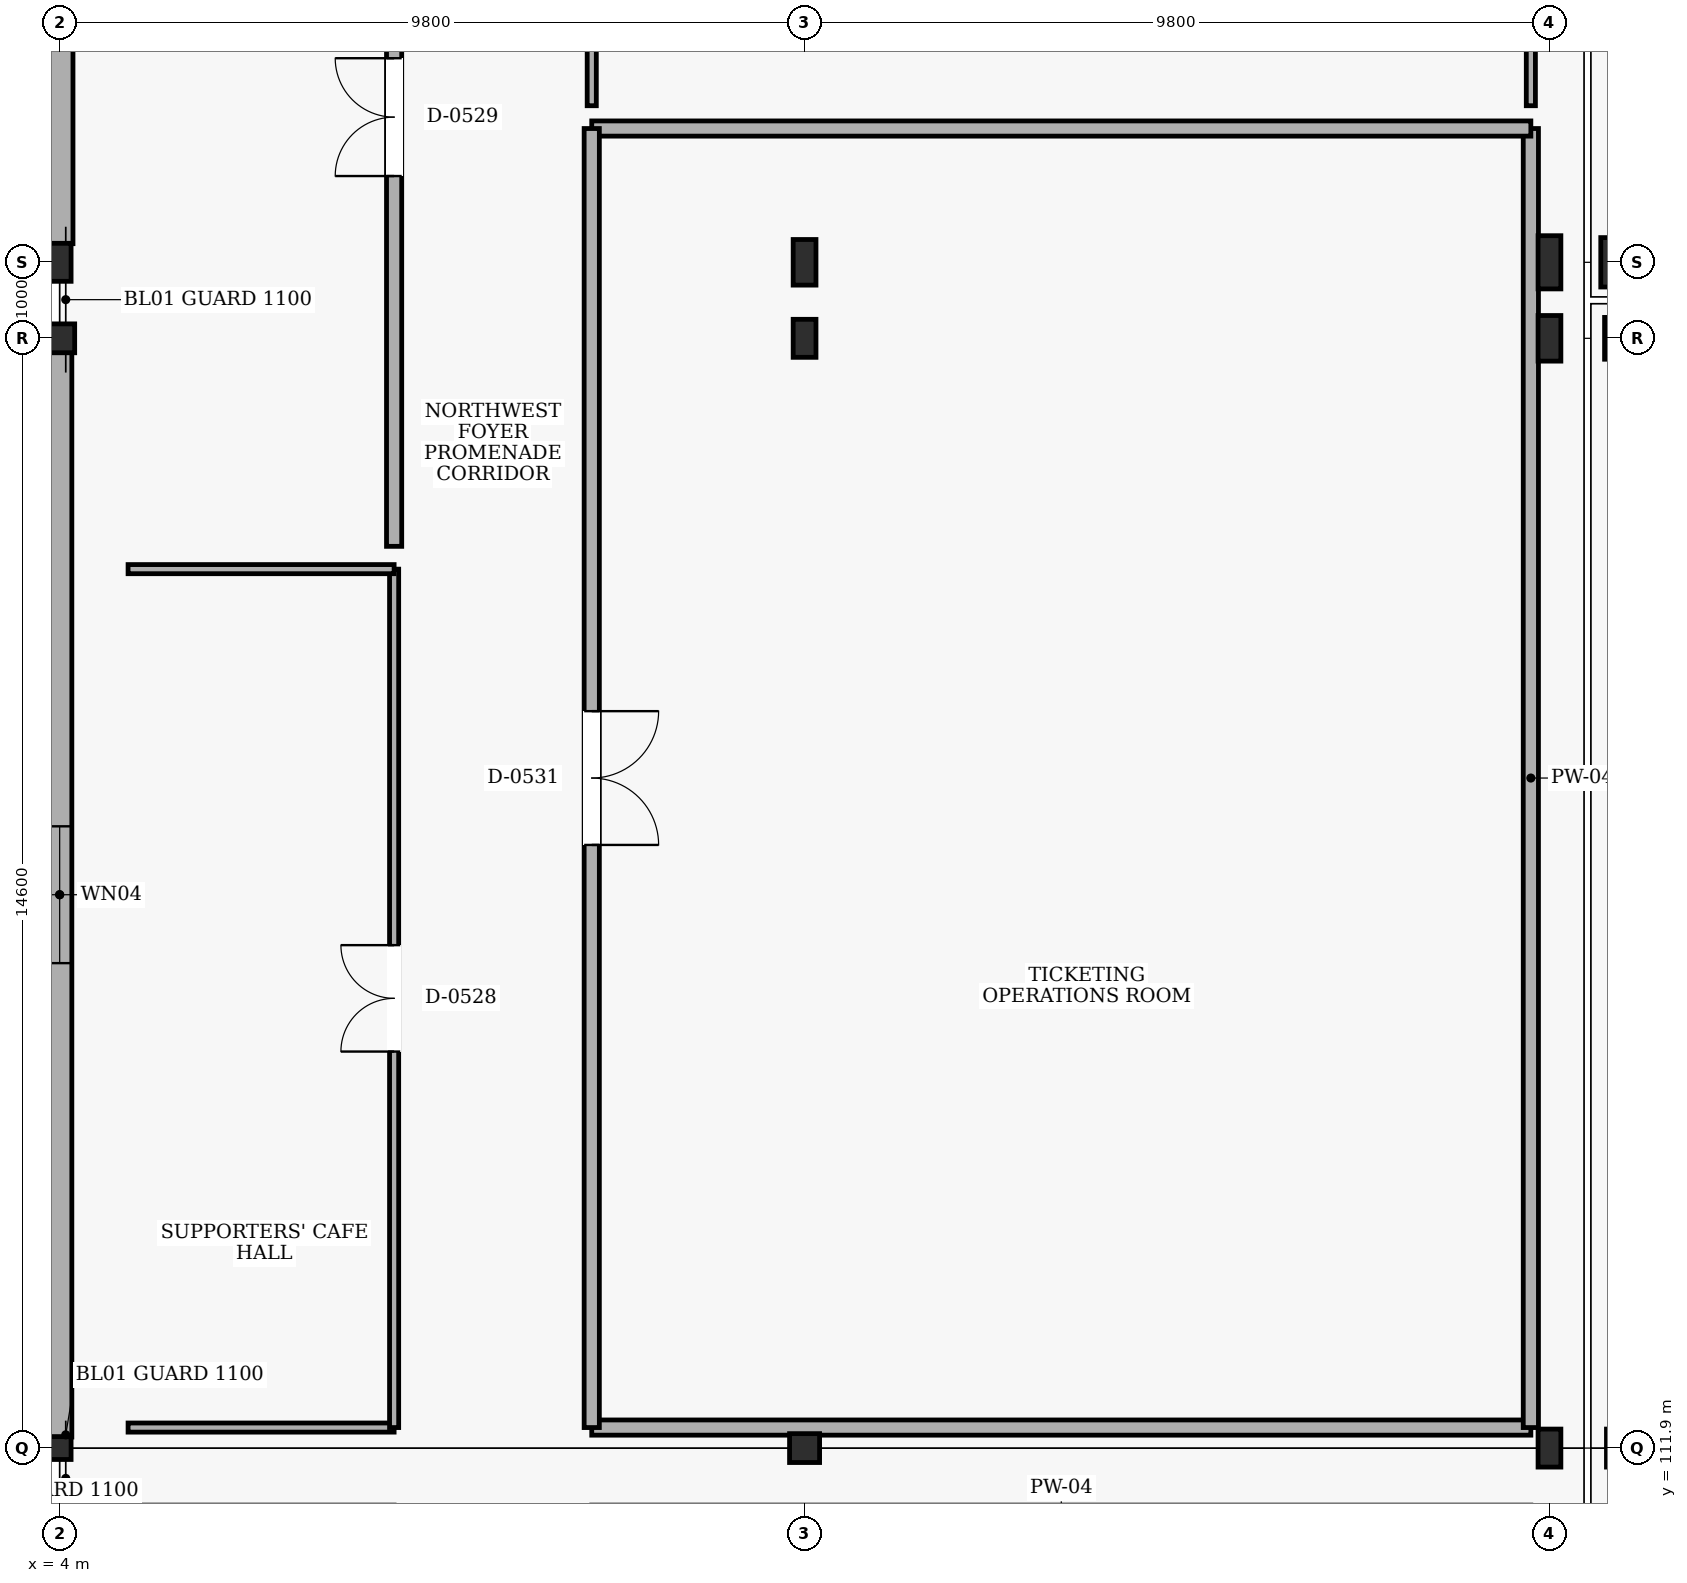
"""IFC4 building model, lengths in metres.
Left out: names, types, materials, properties, quantities, classifications, styles, units other than length and angle.
Written with IfcOpenShell. Run it as: python <this file> out.ifc"""

import sys

from ifc_helpers import new_model, si_unit, direction, frame, frame_2d, origin, origin_2d, place, context, subcontext, project, spatial, rectangle, hollow_rectangle, i_section, extrude, element, fill, save


model = new_model("IFC4")
c1 = context("Model", 3, precision=1e-05, world=origin(), true_north=direction((0.0, 1.0)))
c2 = subcontext(c1, "Body", "Model", "MODEL_VIEW")
j1 = project(units=[si_unit("LENGTHUNIT", "METRE"), si_unit("PLANEANGLEUNIT", "RADIAN")], contexts=[c1])
p1 = place(None, origin())
s1 = spatial("IfcSite", under=j1, at=p1, CompositionType="ELEMENT")
p2 = place(p1, origin())
s2 = spatial("IfcBuilding", under=s1, at=p2, CompositionType="ELEMENT")
p3 = place(p2, frame((0.0, 0.0, 5.4)))
s3 = spatial("IfcBuildingStorey", under=s2, at=p3, CompositionType="ELEMENT", Elevation=5.4)
p4 = place(p3, frame((4.0, 111.9, 0.0), z_axis=(0.0, 0.0, 1.0), x_axis=(1.0, 0.0, 0.0)))
e1 = element("IfcColumn", 1, at=p4, inside=s3, PredefinedType="COLUMN", context=c2, shape_type="SweptSolid", body=[
    extrude(hollow_rectangle(XDim=0.3, YDim=0.3, WallThickness=0.016, at=origin_2d()), origin(), (0.0, 0.0, 1.0), 4.8),
])
p5 = place(p3, frame((4.0, 126.5, 0.0), z_axis=(0.0, 0.0, 1.0), x_axis=(1.0, 0.0, 0.0)))
e2 = element("IfcColumn", 2, at=p5, inside=s3, PredefinedType="COLUMN", context=c2, shape_type="SweptSolid", body=[
    extrude(i_section(OverallWidth=0.395, OverallDepth=0.38, WebThickness=0.019, FlangeThickness=0.03, at=origin_2d()), origin(), (0.0, 0.0, 1.0), 4.8),
])
p6 = place(p3, frame((4.0, 127.5, 0.0), z_axis=(0.0, 0.0, 1.0), x_axis=(1.0, 0.0, 0.0)))
e3 = element("IfcColumn", 3, at=p6, inside=s3, PredefinedType="COLUMN", context=c2, shape_type="SweptSolid", body=[
    extrude(i_section(OverallWidth=0.3, OverallDepth=0.5, WebThickness=0.014, FlangeThickness=0.028, at=origin_2d()), origin(), (0.0, 0.0, 1.0), 4.8),
])
p7 = place(p3, frame((13.8, 111.9, 0.0), z_axis=(0.0, 0.0, 1.0), x_axis=(1.0, 0.0, 0.0)))
e4 = element("IfcColumn", 4, at=p7, inside=s3, PredefinedType="COLUMN", context=c2, shape_type="SweptSolid", body=[
    extrude(i_section(OverallWidth=0.395, OverallDepth=0.38, WebThickness=0.019, FlangeThickness=0.03, at=origin_2d()), origin(), (0.0, 0.0, 1.0), 4.8),
])
p8 = place(p3, frame((13.8, 126.5, 0.0), z_axis=(0.0, 0.0, 1.0), x_axis=(1.0, 0.0, 0.0)))
e5 = element("IfcColumn", 5, at=p8, inside=s3, PredefinedType="COLUMN", context=c2, shape_type="SweptSolid", body=[
    extrude(i_section(OverallWidth=0.3, OverallDepth=0.5, WebThickness=0.014, FlangeThickness=0.028, at=origin_2d()), origin(), (0.0, 0.0, 1.0), 4.8),
])
p9 = place(p3, frame((13.8, 127.5, 0.0), z_axis=(0.0, 0.0, 1.0), x_axis=(1.0, 0.0, 0.0)))
e6 = element("IfcColumn", 6, at=p9, inside=s3, PredefinedType="COLUMN", context=c2, shape_type="SweptSolid", body=[
    extrude(i_section(OverallWidth=0.3, OverallDepth=0.6, WebThickness=0.015, FlangeThickness=0.03, at=origin_2d()), origin(), (0.0, 0.0, 1.0), 4.8),
])
p10 = place(p3, frame((23.6, 111.9, 0.0), z_axis=(0.0, 0.0, 1.0), x_axis=(1.0, 0.0, 0.0)))
e7 = element("IfcColumn", 7, at=p10, inside=s3, PredefinedType="COLUMN", context=c2, shape_type="SweptSolid", body=[
    extrude(i_section(OverallWidth=0.3, OverallDepth=0.5, WebThickness=0.014, FlangeThickness=0.028, at=origin_2d()), origin(), (0.0, 0.0, 1.0), 4.8),
])
p11 = place(p3, frame((23.6, 126.5, 0.0), z_axis=(0.0, 0.0, 1.0), x_axis=(1.0, 0.0, 0.0)))
e8 = element("IfcColumn", 8, at=p11, inside=s3, PredefinedType="COLUMN", context=c2, shape_type="SweptSolid", body=[
    extrude(i_section(OverallWidth=0.3, OverallDepth=0.6, WebThickness=0.015, FlangeThickness=0.03, at=origin_2d()), origin(), (0.0, 0.0, 1.0), 4.8),
])
p12 = place(p3, frame((23.6, 127.5, 0.0), z_axis=(0.0, 0.0, 1.0), x_axis=(1.0, 0.0, 0.0)))
e9 = element("IfcColumn", 9, at=p12, inside=s3, PredefinedType="COLUMN", context=c2, shape_type="SweptSolid", body=[
    extrude(i_section(OverallWidth=0.3, OverallDepth=0.7, WebThickness=0.017, FlangeThickness=0.032, at=origin_2d()), origin(), (0.0, 0.0, 1.0), 4.8),
])
p13 = place(p3, frame((24.6, 111.9, 0.0), z_axis=(0.0, 0.0, 1.0), x_axis=(1.0, 0.0, 0.0)))
e10 = element("IfcColumn", 10, at=p13, inside=s3, PredefinedType="COLUMN", context=c2, shape_type="SweptSolid", body=[
    extrude(rectangle(XDim=0.5, YDim=0.5, at=origin_2d()), origin(), (0.0, 0.0, 1.0), 4.8),
])
p14 = place(p3, frame((24.6, 126.5, 0.0), z_axis=(0.0, 0.0, 1.0), x_axis=(1.0, 0.0, 0.0)))
e11 = element("IfcColumn", 11, at=p14, inside=s3, PredefinedType="COLUMN", context=c2, shape_type="SweptSolid", body=[
    extrude(rectangle(XDim=0.55, YDim=0.55, at=origin_2d()), origin(), (0.0, 0.0, 1.0), 4.8),
])
p15 = place(p3, frame((24.6, 127.5, 0.0), z_axis=(0.0, 0.0, 1.0), x_axis=(1.0, 0.0, 0.0)))
e12 = element("IfcColumn", 12, at=p15, inside=s3, PredefinedType="COLUMN", context=c2, shape_type="SweptSolid", body=[
    extrude(rectangle(XDim=0.65, YDim=0.65, at=origin_2d()), origin(), (0.0, 0.0, 1.0), 4.8),
])
p16 = place(p3, frame((4.0, 112.045, 0.0), z_axis=(0.0, 0.0, 1.0), x_axis=(0.0, 1.0, 0.0)))
e13 = element("IfcWall", 13, at=p16, inside=s3, PredefinedType="SOLIDWALL", context=c2, shape_type="SweptSolid", body=[
    extrude(rectangle(XDim=14.27, YDim=0.32, at=frame_2d((7.135, 0.0))), origin(), (0.0, 0.0, 1.0), 4.03),
])
p17 = place(p16, frame((6.235, 0.0, 0.9)))
e14 = element("IfcOpeningElement", 14, at=p17, cuts=e13, PredefinedType="OPENING", context=c2, shape_type="SweptSolid", body=[
    extrude(rectangle(XDim=1.8, YDim=1.5, at=frame_2d((0.9, 0.75))), frame((0.0, 0.17, 0.0), z_axis=(0.0, -1.0, 0.0), x_axis=(1.0, 0.0, 0.0)), (0.0, 0.0, 1.0), 0.34),
])
p18 = place(p3, frame((4.0, 127.745, 0.0), z_axis=(0.0, 0.0, 1.0), x_axis=(0.0, 1.0, 0.0)))
e15 = element("IfcWall", 15, at=p18, inside=s3, PredefinedType="SOLIDWALL", context=c2, shape_type="SweptSolid", body=[
    extrude(rectangle(XDim=7.56, YDim=0.35, at=frame_2d((3.78, 0.0))), origin(), (0.0, 0.0, 1.0), 3.78),
])
p19 = place(p18, frame((2.78, 0.0, 0.9)))
e16 = element("IfcOpeningElement", 16, at=p19, cuts=e15, PredefinedType="OPENING", context=c2, shape_type="SweptSolid", body=[
    extrude(rectangle(XDim=2.0, YDim=1.5, at=frame_2d((1.0, 0.75))), frame((0.0, 0.185, 0.0), z_axis=(0.0, -1.0, 0.0), x_axis=(1.0, 0.0, 0.0)), (0.0, 0.0, 1.0), 0.37),
])
p20 = place(p3, frame((4.9, 112.17, 0.0), z_axis=(0.0, 0.0, 1.0), x_axis=(1.0, 0.0, 0.0)))
e17 = element("IfcWall", 17, at=p20, inside=s3, PredefinedType="PARTITIONING", context=c2, shape_type="SweptSolid", body=[
    extrude(rectangle(XDim=3.5, YDim=0.12, at=frame_2d((1.75, 0.0))), origin(), (0.0, 0.0, 1.0), 3.68),
])
p21 = place(p3, frame((8.4, 112.17, 0.0), z_axis=(0.0, 0.0, 1.0), x_axis=(0.0, 1.0, 0.0)))
e18 = element("IfcWall", 18, at=p21, inside=s3, PredefinedType="PARTITIONING", context=c2, shape_type="SweptSolid", body=[
    extrude(rectangle(XDim=11.293, YDim=0.12, at=frame_2d((5.647, 0.0))), origin(), (0.0, 0.0, 1.0), 4.5),
])
p22 = place(p21, frame((4.947, 0.0, 0.0)))
e19 = element("IfcOpeningElement", 19, at=p22, cuts=e18, PredefinedType="OPENING", context=c2, shape_type="SweptSolid", body=[
    extrude(rectangle(XDim=1.4, YDim=2.2, at=frame_2d((0.7, 1.1))), frame((0.0, 0.07, 0.0), z_axis=(0.0, -1.0, 0.0), x_axis=(1.0, 0.0, 0.0)), (0.0, 0.0, 1.0), 0.14),
])
p23 = place(p3, frame((8.4, 123.463, 0.0), z_axis=(0.0, 0.0, 1.0), x_axis=(-1.0, 0.0, 0.0)))
e20 = element("IfcWall", 20, at=p23, inside=s3, PredefinedType="PARTITIONING", context=c2, shape_type="SweptSolid", body=[
    extrude(rectangle(XDim=3.5, YDim=0.12, at=frame_2d((1.75, 0.0))), origin(), (0.0, 0.0, 1.0), 4.5),
])
p24 = place(p3, frame((8.4, 123.763, 0.0), z_axis=(0.0, 0.0, 1.0), x_axis=(0.0, 1.0, 0.0)))
e21 = element("IfcWall", 21, at=p24, inside=s3, PredefinedType="PARTITIONING", context=c2, shape_type="SweptSolid", body=[
    extrude(rectangle(XDim=11.293, YDim=0.2, at=frame_2d((5.647, 0.0))), origin(), (0.0, 0.0, 1.0), 4.5),
])
p25 = place(p24, frame((4.872, 0.0, 0.0)))
e22 = element("IfcOpeningElement", 22, at=p25, cuts=e21, PredefinedType="OPENING", context=c2, shape_type="SweptSolid", body=[
    extrude(rectangle(XDim=1.55, YDim=2.2, at=frame_2d((0.775, 1.1))), frame((0.0, 0.11, 0.0), z_axis=(0.0, -1.0, 0.0), x_axis=(1.0, 0.0, 0.0)), (0.0, 0.0, 1.0), 0.22),
])
p26 = place(p3, frame((11.0, 112.17, 0.0), z_axis=(0.0, 0.0, 1.0), x_axis=(1.0, 0.0, 0.0)))
e23 = element("IfcWall", 23, at=p26, inside=s3, PredefinedType="PARTITIONING", context=c2, shape_type="SweptSolid", body=[
    extrude(rectangle(XDim=12.355, YDim=0.2, at=frame_2d((6.177, 0.0))), origin(), (0.0, 0.0, 1.0), 3.53),
])
p27 = place(p3, frame((23.355, 112.17, 0.0), z_axis=(0.0, 0.0, 1.0), x_axis=(0.0, 1.0, 0.0)))
e24 = element("IfcWall", 24, at=p27, inside=s3, PredefinedType="PARTITIONING", context=c2, shape_type="SweptSolid", body=[
    extrude(rectangle(XDim=17.09, YDim=0.2, at=frame_2d((8.545, 0.0))), origin(), (0.0, 0.0, 1.0), 3.78),
])
p28 = place(p3, frame((23.355, 129.26, 0.0), z_axis=(0.0, 0.0, 1.0), x_axis=(-1.0, 0.0, 0.0)))
e25 = element("IfcWall", 25, at=p28, inside=s3, PredefinedType="PARTITIONING", context=c2, shape_type="SweptSolid", body=[
    extrude(rectangle(XDim=12.355, YDim=0.2, at=frame_2d((6.177, 0.0))), origin(), (0.0, 0.0, 1.0), 4.5),
])
p29 = place(p3, frame((11.0, 129.26, 0.0), z_axis=(0.0, 0.0, 1.0), x_axis=(0.0, -1.0, 0.0)))
e26 = element("IfcWall", 26, at=p29, inside=s3, PredefinedType="PARTITIONING", context=c2, shape_type="SweptSolid", body=[
    extrude(rectangle(XDim=17.09, YDim=0.2, at=frame_2d((8.545, 0.0))), origin(), (0.0, 0.0, 1.0), 4.5),
])
p30 = place(p29, frame((7.665, 0.0, 0.0)))
e27 = element("IfcOpeningElement", 27, at=p30, cuts=e26, PredefinedType="OPENING", context=c2, shape_type="SweptSolid", body=[
    extrude(rectangle(XDim=1.76, YDim=2.25, at=frame_2d((0.88, 1.125))), frame((0.0, 0.11, 0.0), z_axis=(0.0, -1.0, 0.0), x_axis=(1.0, 0.0, 0.0)), (0.0, 0.0, 1.0), 0.22),
])
p31 = place(p3, frame((23.355, 129.56, 0.0), z_axis=(0.0, 0.0, 1.0), x_axis=(0.0, 1.0, 0.0)))
e28 = element("IfcWall", 28, at=p31, inside=s3, PredefinedType="PARTITIONING", context=c2, shape_type="SweptSolid", body=[
    extrude(rectangle(XDim=17.09, YDim=0.12, at=frame_2d((8.545, 0.0))), origin(), (0.0, 0.0, 1.0), 3.78),
])
p32 = place(p3, frame((11.0, 146.65, 0.0), z_axis=(0.0, 0.0, 1.0), x_axis=(0.0, -1.0, 0.0)))
e29 = element("IfcWall", 29, at=p32, inside=s3, PredefinedType="PARTITIONING", context=c2, shape_type="SweptSolid", body=[
    extrude(rectangle(XDim=17.09, YDim=0.12, at=frame_2d((8.545, 0.0))), origin(), (0.0, 0.0, 1.0), 4.5),
])
p33 = place(p32, frame((7.615, 0.0, 0.0)))
e30 = element("IfcOpeningElement", 30, at=p33, cuts=e29, PredefinedType="OPENING", context=c2, shape_type="SweptSolid", body=[
    extrude(rectangle(XDim=1.86, YDim=2.3, at=frame_2d((0.93, 1.15))), frame((0.0, 0.07, 0.0), z_axis=(0.0, -1.0, 0.0), x_axis=(1.0, 0.0, 0.0)), (0.0, 0.0, 1.0), 0.14),
])
p34 = place(p17, origin())
e31 = element("IfcWindow", 31, at=p34, inside=s3, PartitioningType="SINGLE_PANEL", PredefinedType="WINDOW", context=c2, shape_type="SweptSolid", body=[
    extrude(rectangle(XDim=1.8, YDim=1.5, at=frame_2d((0.9, 0.75))), frame((0.0, 0.03, 0.0), z_axis=(0.0, -1.0, 0.0), x_axis=(1.0, 0.0, 0.0)), (0.0, 0.0, 1.0), 0.06),
])
fill(e14, e31)
p35 = place(p22, origin())
e32 = element("IfcDoor", 32, at=p35, inside=s3, OperationType="DOUBLE_DOOR_SINGLE_SWING", PredefinedType="DOOR", context=c2, shape_type="SweptSolid", body=[
    extrude(rectangle(XDim=1.4, YDim=2.2, at=frame_2d((0.7, 1.1))), frame((0.0, 0.025, 0.0), z_axis=(0.0, -1.0, 0.0), x_axis=(1.0, 0.0, 0.0)), (0.0, 0.0, 1.0), 0.05),
])
fill(e19, e32)
p36 = place(p25, origin())
e33 = element("IfcDoor", 33, at=p36, inside=s3, OperationType="DOUBLE_DOOR_SINGLE_SWING", PredefinedType="DOOR", context=c2, shape_type="SweptSolid", body=[
    extrude(rectangle(XDim=1.55, YDim=2.2, at=frame_2d((0.775, 1.1))), frame((0.0, 0.025, 0.0), z_axis=(0.0, -1.0, 0.0), x_axis=(1.0, 0.0, 0.0)), (0.0, 0.0, 1.0), 0.05),
])
fill(e22, e33)
p37 = place(p30, origin())
e34 = element("IfcDoor", 34, at=p37, inside=s3, OperationType="DOUBLE_DOOR_SINGLE_SWING", PredefinedType="DOOR", context=c2, shape_type="SweptSolid", body=[
    extrude(rectangle(XDim=1.76, YDim=2.25, at=frame_2d((0.88, 1.125))), frame((0.0, 0.025, 0.0), z_axis=(0.0, -1.0, 0.0), x_axis=(1.0, 0.0, 0.0)), (0.0, 0.0, 1.0), 0.05),
])
fill(e27, e34)
save(model, sys.argv[1])
